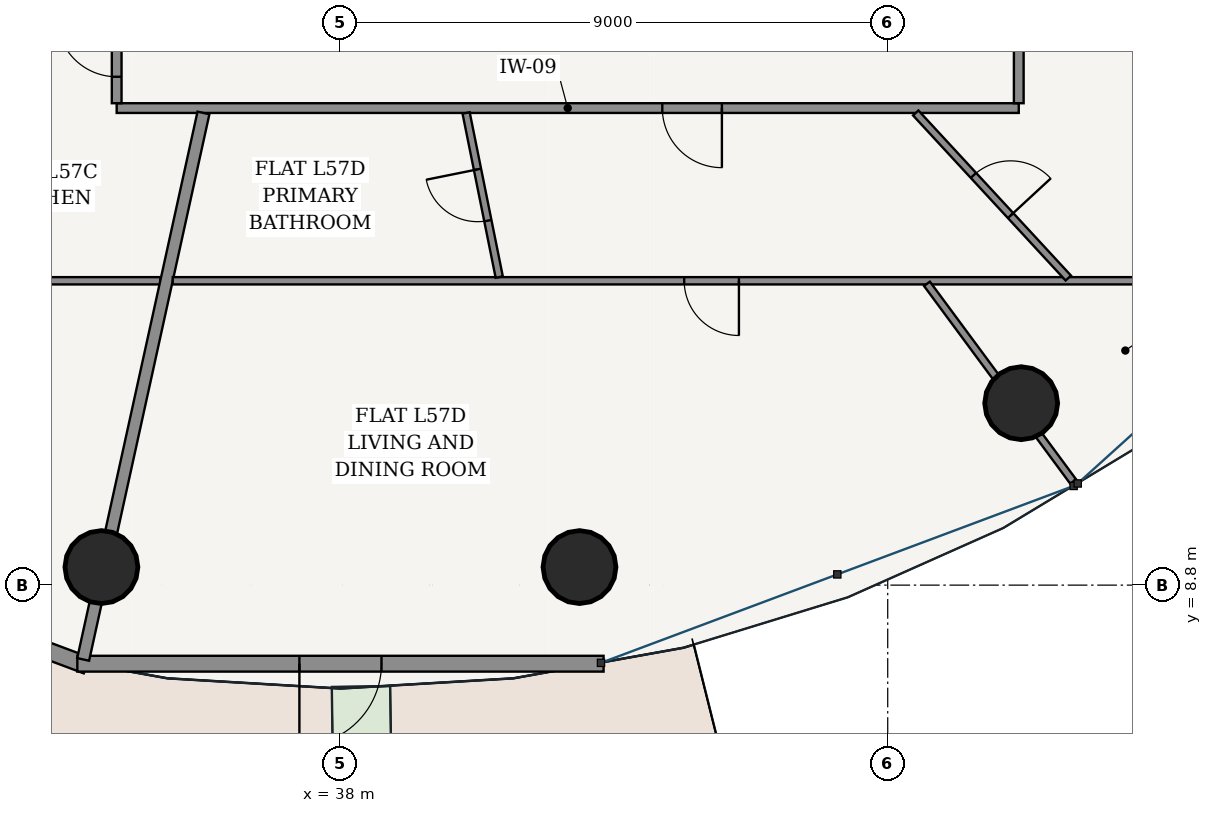
"""IFC4 building model, lengths in metres.
Left out: names, types, materials, properties, quantities, classifications, styles, units other than length and angle.
Written with IfcOpenShell. Run it as: python <this file> out.ifc"""

import sys

from ifc_helpers import new_model, si_unit, direction, frame, frame_2d, origin, origin_2d, place, context, subcontext, project, spatial, rectangle, hollow_circle, extrude, source, transform, mapped, element, fill, save


model = new_model("IFC4")
c1 = context("Model", 3, precision=1e-05, world=origin(), true_north=direction((-0.2419218956, 0.970295726276)))
c2 = subcontext(c1, "Body", "Model", "MODEL_VIEW")
j1 = project(units=[si_unit("LENGTHUNIT", "METRE"), si_unit("PLANEANGLEUNIT", "RADIAN")], contexts=[c1])
p1 = place(None, origin())
s1 = spatial("IfcSite", under=j1, at=p1, CompositionType="ELEMENT")
p2 = place(p1, origin())
s2 = spatial("IfcBuilding", under=s1, at=p2, CompositionType="ELEMENT")
p3 = place(p2, frame((0.0, 0.0, 217.1)))
s3 = spatial("IfcBuildingStorey", under=s2, at=p3, CompositionType="ELEMENT", Elevation=217.1)
for number, where, z_axis, x_axis in (
    (1, (34.069, 9.097, 0.0), (0.0, 0.0, 1.0), (1.0, 0.0, 0.0)),
    (2, (41.931, 9.097, 0.0), (0.0, 0.0, 1.0), (1.0, 0.0, 0.0)),
    (3, (49.195, 11.792, 0.0), (0.0, 0.0, 1.0), (1.0, 0.0, 0.0)),
):
    element("IfcColumn", number, at=place(p3, frame(where, z_axis=z_axis, x_axis=x_axis)), inside=s3, PredefinedType="COLUMN", context=c2, shape_type="SweptSolid", body=[
        extrude(hollow_circle(Radius=0.6, WallThickness=0.038, at=origin_2d()), origin(), (0.0, 0.0, 1.0), 3.7),
    ])
p4 = place(p3, frame((25.83, 10.473, 0.0), z_axis=(0.0, 0.0, 1.0), x_axis=(0.936556918375, -0.350515532672, 0.0)))
e4 = element("IfcWall", 4, at=p4, inside=s3, PredefinedType="SOLIDWALL", context=c2, shape_type="SweptSolid", body=[
    extrude(rectangle(XDim=8.539, YDim=0.28, at=frame_2d((4.27, 0.0))), origin(), (0.0, 0.0, 1.0), 3.435),
])
p5 = place(p4, frame((1.256, 0.0, 0.85)))
e5 = element("IfcOpeningElement", 5, at=p5, cuts=e4, PredefinedType="OPENING", context=c2, shape_type="SweptSolid", body=[
    extrude(rectangle(XDim=2.1, YDim=1.95, at=frame_2d((1.05, 0.975))), frame((0.0, 0.15, 0.0), z_axis=(0.0, -1.0, 0.0), x_axis=(1.0, 0.0, 0.0)), (0.0, 0.0, 1.0), 0.3),
])
p6 = place(p4, frame((5.184, 0.0, 0.85)))
e6 = element("IfcOpeningElement", 6, at=p6, cuts=e4, PredefinedType="OPENING", context=c2, shape_type="SweptSolid", body=[
    extrude(rectangle(XDim=2.1, YDim=1.95, at=frame_2d((1.05, 0.975))), frame((0.0, 0.15, 0.0), z_axis=(0.0, -1.0, 0.0), x_axis=(1.0, 0.0, 0.0)), (0.0, 0.0, 1.0), 0.3),
])
p7 = place(p3, frame((33.673, 7.508, 0.0), z_axis=(0.0, 0.0, 1.0), x_axis=(1.0, 0.0, 0.0)))
e7 = element("IfcWall", 7, at=p7, inside=s3, PredefinedType="SOLIDWALL", context=c2, shape_type="SweptSolid", body=[
    extrude(rectangle(XDim=8.654, YDim=0.26, at=frame_2d((4.327, 0.0))), origin(), (0.0, 0.0, 1.0), 3.435),
])
p8 = place(p7, frame((3.652, 0.0, 0.0)))
e8 = element("IfcOpeningElement", 8, at=p8, cuts=e7, PredefinedType="OPENING", context=c2, shape_type="SweptSolid", body=[
    extrude(rectangle(XDim=1.35, YDim=2.2, at=frame_2d((0.675, 1.1))), frame((0.0, 0.14, 0.0), z_axis=(0.0, -1.0, 0.0), x_axis=(1.0, 0.0, 0.0)), (0.0, 0.0, 1.0), 0.28),
])
p9 = place(p3, frame((34.32, 16.645, 0.0), z_axis=(0.0, 0.0, 1.0), x_axis=(1.0, 0.0, 0.0)))
e9 = element("IfcWall", 9, at=p9, inside=s3, PredefinedType="PARTITIONING", context=c2, shape_type="SweptSolid", body=[
    extrude(rectangle(XDim=14.835, YDim=0.16, at=frame_2d((7.417, 0.0))), origin(), (0.0, 0.0, 1.0), 2.951),
])
p10 = place(p9, frame((8.973, 0.0, 0.0)))
e10 = element("IfcOpeningElement", 10, at=p10, cuts=e9, PredefinedType="OPENING", context=c2, shape_type="SweptSolid", body=[
    extrude(rectangle(XDim=0.98, YDim=2.2, at=frame_2d((0.49, 1.1))), frame((0.0, 0.09, 0.0), z_axis=(0.0, -1.0, 0.0), x_axis=(1.0, 0.0, 0.0)), (0.0, 0.0, 1.0), 0.18),
])
p11 = place(p3, frame((34.32, 16.725, 0.0), z_axis=(0.0, 0.0, 1.0), x_axis=(0.0, 1.0, 0.0)))
e11 = element("IfcWall", 11, at=p11, inside=s3, PredefinedType="PARTITIONING", context=c2, shape_type="SweptSolid", body=[
    extrude(rectangle(XDim=1.85, YDim=0.16, at=frame_2d((0.925, 0.0))), origin(), (0.0, 0.0, 1.0), 3.435),
])
p12 = place(p11, frame((0.435, 0.0, 0.0)))
e12 = element("IfcOpeningElement", 12, at=p12, cuts=e11, PredefinedType="OPENING", context=c2, shape_type="SweptSolid", body=[
    extrude(rectangle(XDim=0.98, YDim=2.2, at=frame_2d((0.49, 1.1))), frame((0.0, 0.09, 0.0), z_axis=(0.0, -1.0, 0.0), x_axis=(1.0, 0.0, 0.0)), (0.0, 0.0, 1.0), 0.18),
])
p13 = place(p3, frame((49.155, 16.725, 0.0), z_axis=(0.0, 0.0, 1.0), x_axis=(0.0, 1.0, 0.0)))
e13 = element("IfcWall", 13, at=p13, inside=s3, PredefinedType="PARTITIONING", context=c2, shape_type="SweptSolid", body=[
    extrude(rectangle(XDim=18.3, YDim=0.16, at=frame_2d((9.15, 0.0))), origin(), (0.0, 0.0, 1.0), 2.951),
])
p14 = place(p13, frame((15.837, 0.0, 0.0)))
e14 = element("IfcOpeningElement", 14, at=p14, cuts=e13, PredefinedType="OPENING", context=c2, shape_type="SweptSolid", body=[
    extrude(rectangle(XDim=0.98, YDim=2.2, at=frame_2d((0.49, 1.1))), frame((0.0, 0.09, 0.0), z_axis=(0.0, -1.0, 0.0), x_axis=(1.0, 0.0, 0.0)), (0.0, 0.0, 1.0), 0.18),
])
p15 = place(p3, frame((35.038, 13.805, 0.0), z_axis=(0.0, 0.0, 1.0), x_axis=(-1.0, 0.0, 0.0)))
e15 = element("IfcWall", 15, at=p15, inside=s3, PredefinedType="PARTITIONING", context=c2, shape_type="SweptSolid", body=[
    extrude(rectangle(XDim=3.558, YDim=0.12, at=frame_2d((1.779, 0.0))), origin(), (0.0, 0.0, 1.0), 2.951),
])
p16 = place(p3, frame((35.747, 16.565, 0.0), z_axis=(0.0, 0.0, 1.0), x_axis=(-0.214957946814, -0.976623305631, 0.0)))
e16 = element("IfcWall", 16, at=p16, inside=s3, PredefinedType="PARTITIONING", context=c2, shape_type="SweptSolid", body=[
    extrude(rectangle(XDim=9.202, YDim=0.2, at=frame_2d((4.601, 0.0))), origin(), (0.0, 0.0, 1.0), 2.951),
])
p17 = place(p3, frame((51.995, 13.805, 0.0), z_axis=(0.0, 0.0, 1.0), x_axis=(-1.0, 0.0, 0.0)))
e17 = element("IfcWall", 17, at=p17, inside=s3, PredefinedType="PARTITIONING", context=c2, shape_type="SweptSolid", body=[
    extrude(rectangle(XDim=16.753, YDim=0.12, at=frame_2d((8.377, 0.0))), origin(), (0.0, 0.0, 1.0), 2.951),
])
p18 = place(p17, frame((7.442, 0.0, 0.0)))
e18 = element("IfcOpeningElement", 18, at=p18, cuts=e17, PredefinedType="OPENING", context=c2, shape_type="SweptSolid", body=[
    extrude(rectangle(XDim=0.9, YDim=2.15, at=frame_2d((0.45, 1.075))), frame((0.0, 0.07, 0.0), z_axis=(0.0, -1.0, 0.0), x_axis=(1.0, 0.0, 0.0)), (0.0, 0.0, 1.0), 0.14),
])
p19 = place(p3, frame((47.646, 13.755, 0.0), z_axis=(0.0, 0.0, 1.0), x_axis=(0.594518373783, -0.80408202519, 0.0)))
e19 = element("IfcWall", 19, at=p19, inside=s3, PredefinedType="PARTITIONING", context=c2, shape_type="SweptSolid", body=[
    extrude(rectangle(XDim=4.044, YDim=0.12, at=frame_2d((2.022, 0.0))), origin(), (0.0, 0.0, 1.0), 2.951),
])
p20 = place(p3, frame((40.066, 16.565, 0.0), z_axis=(0.0, 0.0, 1.0), x_axis=(0.197974199315, -0.980207231358, 0.0)))
e20 = element("IfcWall", 20, at=p20, inside=s3, PredefinedType="PARTITIONING", context=c2, shape_type="SweptSolid", body=[
    extrude(rectangle(XDim=2.754, YDim=0.12, at=frame_2d((1.377, 0.0))), origin(), (0.0, 0.0, 1.0), 3.11),
])
p21 = place(p20, frame((0.947, 0.0, 0.0)))
e21 = element("IfcOpeningElement", 21, at=p21, cuts=e20, PredefinedType="OPENING", context=c2, shape_type="SweptSolid", body=[
    extrude(rectangle(XDim=0.86, YDim=2.15, at=frame_2d((0.43, 1.075))), frame((0.0, 0.07, 0.0), z_axis=(0.0, -1.0, 0.0), x_axis=(1.0, 0.0, 0.0)), (0.0, 0.0, 1.0), 0.14),
])
p22 = place(p3, frame((47.46, 16.565, 0.0), z_axis=(0.0, 0.0, 1.0), x_axis=(0.678787443458, -0.734334805524, 0.0)))
e22 = element("IfcWall", 22, at=p22, inside=s3, PredefinedType="PARTITIONING", context=c2, shape_type="SweptSolid", body=[
    extrude(rectangle(XDim=3.696, YDim=0.12, at=frame_2d((1.848, 0.0))), origin(), (0.0, 0.0, 1.0), 2.951),
])
p23 = place(p22, frame((1.398, 0.0, 0.0)))
e23 = element("IfcOpeningElement", 23, at=p23, cuts=e22, PredefinedType="OPENING", context=c2, shape_type="SweptSolid", body=[
    extrude(rectangle(XDim=0.9, YDim=2.15, at=frame_2d((0.45, 1.075))), frame((0.0, 0.07, 0.0), z_axis=(0.0, -1.0, 0.0), x_axis=(1.0, 0.0, 0.0)), (0.0, 0.0, 1.0), 0.14),
])
m1 = source(origin(), c2, "Body", "SweptSolid", [
    extrude(rectangle(XDim=1.35, YDim=2.2, at=frame_2d((0.675, 1.1))), frame((0.0, 0.025, 0.0), z_axis=(0.0, -1.0, 0.0), x_axis=(1.0, 0.0, 0.0)), (0.0, 0.0, 1.0), 0.05),
])
p24 = place(p8, frame((1.35, 0.0, 0.0), z_axis=(0.0, 0.0, 1.0), x_axis=(-1.0, 0.0, 0.0)))
e24 = element("IfcDoor", 24, at=p24, inside=s3, OperationType="SINGLE_SWING_RIGHT", PredefinedType="DOOR", context=c2, shape_type="MappedRepresentation", body=[
    mapped(m1, transform((0.0, 0.0, 0.0), scale=1.0)),
])
fill(e8, e24)
m2 = source(origin(), c2, "Body", "SweptSolid", [
    extrude(rectangle(XDim=0.98, YDim=2.2, at=frame_2d((0.49, 1.1))), frame((0.0, 0.025, 0.0), z_axis=(0.0, -1.0, 0.0), x_axis=(1.0, 0.0, 0.0)), (0.0, 0.0, 1.0), 0.05),
])
p25 = place(p12, origin())
e25 = element("IfcDoor", 25, at=p25, inside=s3, OperationType="SINGLE_SWING_RIGHT", PredefinedType="DOOR", context=c2, shape_type="MappedRepresentation", body=[
    mapped(m2, transform((0.0, 0.0, 0.0), scale=1.0)),
])
fill(e12, e25)
p26 = place(p10, frame((0.98, 0.0, 0.0), z_axis=(0.0, 0.0, 1.0), x_axis=(-1.0, 0.0, 0.0)))
e26 = element("IfcDoor", 26, at=p26, inside=s3, OperationType="SINGLE_SWING_LEFT", PredefinedType="DOOR", context=c2, shape_type="MappedRepresentation", body=[
    mapped(m2, transform((0.0, 0.0, 0.0), scale=1.0)),
])
fill(e10, e26)
m3 = source(origin(), c2, "Body", "SweptSolid", [
    extrude(rectangle(XDim=0.86, YDim=2.15, at=frame_2d((0.43, 1.075))), frame((0.0, 0.025, 0.0), z_axis=(0.0, -1.0, 0.0), x_axis=(1.0, 0.0, 0.0)), (0.0, 0.0, 1.0), 0.05),
])
p27 = place(p21, frame((0.86, 0.0, 0.0), z_axis=(0.0, 0.0, 1.0), x_axis=(-1.0, 0.0, 0.0)))
e27 = element("IfcDoor", 27, at=p27, inside=s3, OperationType="SINGLE_SWING_RIGHT", PredefinedType="DOOR", context=c2, shape_type="MappedRepresentation", body=[
    mapped(m3, transform((0.0, 0.0, 0.0), scale=1.0)),
])
fill(e21, e27)
m4 = source(origin(), c2, "Body", "SweptSolid", [
    extrude(rectangle(XDim=0.9, YDim=2.15, at=frame_2d((0.45, 1.075))), frame((0.0, 0.025, 0.0), z_axis=(0.0, -1.0, 0.0), x_axis=(1.0, 0.0, 0.0)), (0.0, 0.0, 1.0), 0.05),
])
p28 = place(p18, origin())
e28 = element("IfcDoor", 28, at=p28, inside=s3, OperationType="SINGLE_SWING_LEFT", PredefinedType="DOOR", context=c2, shape_type="MappedRepresentation", body=[
    mapped(m4, transform((0.0, 0.0, 0.0), scale=1.0)),
])
fill(e18, e28)
p29 = place(p23, origin())
e29 = element("IfcDoor", 29, at=p29, inside=s3, OperationType="SINGLE_SWING_RIGHT", PredefinedType="DOOR", context=c2, shape_type="MappedRepresentation", body=[
    mapped(m4, transform((0.0, 0.0, 0.0), scale=1.0)),
])
fill(e23, e29)
save(model, sys.argv[1])
